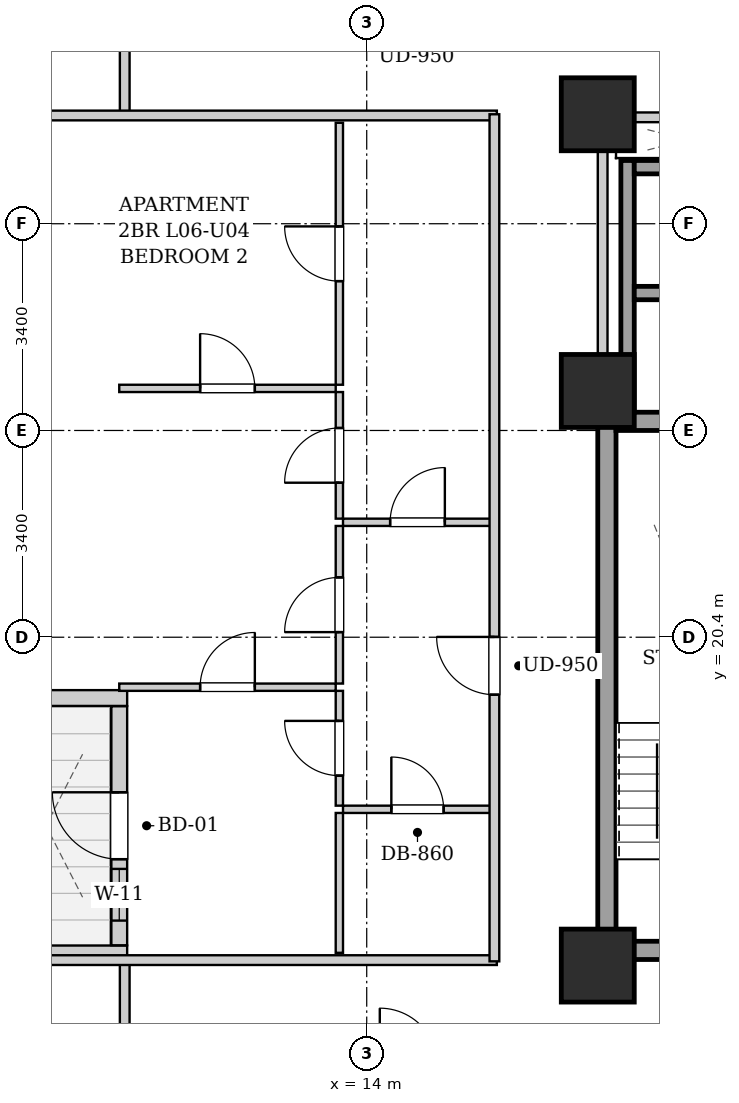
"""IFC4 building model, lengths in metres.
Left out: names, types, materials, properties, quantities, classifications, styles, units other than length and angle.
Written with IfcOpenShell. Run it as: python <this file> out.ifc"""

import sys

from ifc_helpers import new_model, si_unit, direction, frame, frame_2d, origin, origin_2d, place, context, subcontext, project, spatial, rectangle, extrude, element, fill, save


model = new_model("IFC4")
c1 = context("Model", 3, precision=1e-05, world=origin(), true_north=direction((0.0, 1.0)))
c2 = subcontext(c1, "Body", "Model", "MODEL_VIEW")
j1 = project(units=[si_unit("LENGTHUNIT", "METRE"), si_unit("PLANEANGLEUNIT", "RADIAN")], contexts=[c1])
p1 = place(None, origin())
s1 = spatial("IfcSite", under=j1, at=p1, CompositionType="ELEMENT")
p2 = place(p1, origin())
s2 = spatial("IfcBuilding", under=s1, at=p2, CompositionType="ELEMENT")
p3 = place(p2, frame((0.0, 0.0, 29.0)))
s3 = spatial("IfcBuildingStorey", under=s2, at=p3, CompositionType="ELEMENT", Elevation=29.0)
for number, where, z_axis, x_axis in (
    (1, (17.8, 15.0, 0.0), (0.0, 0.0, 1.0), (1.0, 0.0, 0.0)),
    (2, (17.8, 29.0, 0.0), (0.0, 0.0, 1.0), (1.0, 0.0, 0.0)),
    (3, (17.8, 24.45, 0.0), (0.0, 0.0, 1.0), (1.0, 0.0, 0.0)),
):
    element("IfcColumn", number, at=place(p3, frame(where, z_axis=z_axis, x_axis=x_axis)), inside=s3, PredefinedType="COLUMN", context=c2, shape_type="SweptSolid", body=[
        extrude(rectangle(XDim=1.2, YDim=1.2, at=origin_2d()), origin(), (0.0, 0.0, 1.0), 3.2),
    ])
p4 = place(p3, frame((7.66, 15.2, 0.0), z_axis=(0.0, 0.0, 1.0), x_axis=(1.0, 0.0, 0.0)))
e4 = element("IfcWall", 4, at=p4, inside=s3, PredefinedType="SOLIDWALL", context=c2, shape_type="SweptSolid", body=[
    extrude(rectangle(XDim=2.4, YDim=0.26, at=frame_2d((1.2, 0.0))), origin(), (0.0, 0.0, 1.0), 2.94),
])
p5 = place(p3, frame((9.93, 15.334, 0.0), z_axis=(0.0, 0.0, 1.0), x_axis=(0.0, 1.0, 0.0)))
e5 = element("IfcWall", 5, at=p5, inside=s3, PredefinedType="SOLIDWALL", context=c2, shape_type="SweptSolid", body=[
    extrude(rectangle(XDim=3.932, YDim=0.26, at=frame_2d((1.966, 0.0))), origin(), (0.0, 0.0, 1.0), 2.94),
])
p6 = place(p5, frame((1.416, 0.0, 0.0)))
e6 = element("IfcOpeningElement", 6, at=p6, cuts=e5, PredefinedType="OPENING", context=c2, shape_type="SweptSolid", body=[
    extrude(rectangle(XDim=1.1, YDim=2.0, at=frame_2d((0.55, 1.0))), frame((0.0, 0.14, 0.0), z_axis=(0.0, -1.0, 0.0), x_axis=(1.0, 0.0, 0.0)), (0.0, 0.0, 1.0), 0.28),
])
p7 = place(p5, frame((0.406, 0.0, 0.55)))
e7 = element("IfcOpeningElement", 7, at=p7, cuts=e5, PredefinedType="OPENING", context=c2, shape_type="SweptSolid", body=[
    extrude(rectangle(XDim=0.85, YDim=1.2, at=frame_2d((0.425, 0.6))), frame((0.0, 0.14, 0.0), z_axis=(0.0, -1.0, 0.0), x_axis=(1.0, 0.0, 0.0)), (0.0, 0.0, 1.0), 0.28),
])
p8 = place(p3, frame((10.06, 19.4, 0.0), z_axis=(0.0, 0.0, 1.0), x_axis=(-1.0, 0.0, 0.0)))
e8 = element("IfcWall", 8, at=p8, inside=s3, PredefinedType="SOLIDWALL", context=c2, shape_type="SweptSolid", body=[
    extrude(rectangle(XDim=2.4, YDim=0.26, at=frame_2d((1.2, 0.0))), origin(), (0.0, 0.0, 1.0), 2.94),
])
p9 = place(p3, frame((17.95, 15.1, 0.0), z_axis=(0.0, 0.0, 1.0), x_axis=(0.0, 1.0, 0.0)))
e9 = element("IfcWall", 9, at=p9, inside=s3, PredefinedType="SHEAR", context=c2, shape_type="SweptSolid", body=[
    extrude(rectangle(XDim=9.0, YDim=0.3, at=frame_2d((4.5, 0.0))), origin(), (0.0, 0.0, 1.0), 2.94),
])
p10 = place(p3, frame((18.1, 23.95, 0.0), z_axis=(0.0, 0.0, 1.0), x_axis=(1.0, 0.0, 0.0)))
e10 = element("IfcWall", 10, at=p10, inside=s3, PredefinedType="SHEAR", context=c2, shape_type="SweptSolid", body=[
    extrude(rectangle(XDim=2.85, YDim=0.3, at=frame_2d((1.425, 0.0))), origin(), (0.0, 0.0, 1.0), 2.94),
])
p11 = place(p3, frame((18.1, 15.25, 0.0), z_axis=(0.0, 0.0, 1.0), x_axis=(1.0, 0.0, 0.0)))
e11 = element("IfcWall", 11, at=p11, inside=s3, PredefinedType="SHEAR", context=c2, shape_type="SweptSolid", body=[
    extrude(rectangle(XDim=2.85, YDim=0.3, at=frame_2d((1.425, 0.0))), origin(), (0.0, 0.0, 1.0), 2.94),
])
p12 = place(p11, frame((0.86, 0.0, 0.0)))
e12 = element("IfcOpeningElement", 12, at=p12, cuts=e11, PredefinedType="OPENING", context=c2, shape_type="SweptSolid", body=[
    extrude(rectangle(XDim=1.1, YDim=2.05, at=frame_2d((0.55, 1.025))), frame((0.0, 0.16, 0.0), z_axis=(0.0, -1.0, 0.0), x_axis=(1.0, 0.0, 0.0)), (0.0, 0.0, 1.0), 0.32),
])
p13 = place(p3, frame((18.29, 24.1, 0.0), z_axis=(0.0, 0.0, 1.0), x_axis=(0.0, 1.0, 0.0)))
e13 = element("IfcWall", 13, at=p13, inside=s3, PredefinedType="SHEAR", context=c2, shape_type="SweptSolid", body=[
    extrude(rectangle(XDim=4.14, YDim=0.22, at=frame_2d((2.07, 0.0))), origin(), (0.0, 0.0, 1.0), 2.94),
])
for number, where, z_axis, x_axis in (
    (14, (18.4, 26.06, 0.0), (0.0, 0.0, 1.0), (1.0, 0.0, 0.0)),
    (15, (18.4, 28.13, 0.0), (0.0, 0.0, 1.0), (1.0, 0.0, 0.0)),
):
    element("IfcWall", number, at=place(p3, frame(where, z_axis=z_axis, x_axis=x_axis)), inside=s3, PredefinedType="SHEAR", context=c2, shape_type="SweptSolid", body=[
        extrude(rectangle(XDim=1.9, YDim=0.22, at=frame_2d((0.95, 0.0))), origin(), (0.0, 0.0, 1.0), 2.94),
    ])
p14 = place(p3, frame((17.88, 24.12, 0.0), z_axis=(0.0, 0.0, 1.0), x_axis=(0.0, 1.0, 0.0)))
e16 = element("IfcWall", 16, at=p14, inside=s3, PredefinedType="PARTITIONING", context=c2, shape_type="SweptSolid", body=[
    extrude(rectangle(XDim=4.76, YDim=0.16, at=frame_2d((2.38, 0.0))), origin(), (0.0, 0.0, 1.0), 2.275),
])
p15 = place(p3, frame((17.96, 28.95, 0.0), z_axis=(0.0, 0.0, 1.0), x_axis=(1.0, 0.0, 0.0)))
e17 = element("IfcWall", 17, at=p15, inside=s3, PredefinedType="PARTITIONING", context=c2, shape_type="SweptSolid", body=[
    extrude(rectangle(XDim=4.29, YDim=0.16, at=frame_2d((2.145, 0.0))), origin(), (0.0, 0.0, 1.0), 2.155),
])
p16 = place(p15, frame((1.57, 0.0, 0.0)))
e18 = element("IfcOpeningElement", 18, at=p16, cuts=e17, PredefinedType="OPENING", context=c2, shape_type="SweptSolid", body=[
    extrude(rectangle(XDim=0.86, YDim=2.05, at=frame_2d((0.43, 1.025))), frame((0.0, 0.09, 0.0), z_axis=(0.0, -1.0, 0.0), x_axis=(1.0, 0.0, 0.0)), (0.0, 0.0, 1.0), 0.18),
])
for number, where, z_axis, x_axis in (
    (19, (10.02, 13.35, 0.0), (0.0, 0.0, 1.0), (0.0, 1.0, 0.0)),
    (20, (10.02, 28.98, 0.0), (0.0, 0.0, 1.0), (0.0, 1.0, 0.0)),
):
    element("IfcWall", number, at=place(p3, frame(where, z_axis=z_axis, x_axis=x_axis)), inside=s3, PredefinedType="PARTITIONING", context=c2, shape_type="SweptSolid", body=[
        extrude(rectangle(XDim=1.74, YDim=0.16, at=frame_2d((0.87, 0.0))), origin(), (0.0, 0.0, 1.0), 2.94),
    ])
for number, where, z_axis, x_axis in (
    (21, (7.78, 15.09, 0.0), (0.0, 0.0, 1.0), (1.0, 0.0, 0.0)),
    (22, (7.78, 28.98, 0.0), (0.0, 0.0, 1.0), (1.0, 0.0, 0.0)),
):
    element("IfcWall", number, at=place(p3, frame(where, z_axis=z_axis, x_axis=x_axis)), inside=s3, PredefinedType="PARTITIONING", context=c2, shape_type="SweptSolid", body=[
        extrude(rectangle(XDim=8.36, YDim=0.16, at=frame_2d((4.18, 0.0))), origin(), (0.0, 0.0, 1.0), 2.155),
    ])
p17 = place(p3, frame((13.61, 22.29, 0.0), z_axis=(0.0, 0.0, 1.0), x_axis=(1.0, 0.0, 0.0)))
e23 = element("IfcWall", 23, at=p17, inside=s3, PredefinedType="PARTITIONING", context=c2, shape_type="SweptSolid", body=[
    extrude(rectangle(XDim=2.45, YDim=0.12, at=frame_2d((1.225, 0.0))), origin(), (0.0, 0.0, 1.0), 2.94),
])
p18 = place(p17, frame((0.775, 0.0, 0.0)))
e24 = element("IfcOpeningElement", 24, at=p18, cuts=e23, PredefinedType="OPENING", context=c2, shape_type="SweptSolid", body=[
    extrude(rectangle(XDim=0.9, YDim=2.05, at=frame_2d((0.45, 1.025))), frame((0.0, 0.07, 0.0), z_axis=(0.0, -1.0, 0.0), x_axis=(1.0, 0.0, 0.0)), (0.0, 0.0, 1.0), 0.14),
])
p19 = place(p3, frame((13.55, 22.35, 0.0), z_axis=(0.0, 0.0, 1.0), x_axis=(0.0, 1.0, 0.0)))
e25 = element("IfcWall", 25, at=p19, inside=s3, PredefinedType="PARTITIONING", context=c2, shape_type="SweptSolid", body=[
    extrude(rectangle(XDim=2.082, YDim=0.12, at=frame_2d((1.041, 0.0))), origin(), (0.0, 0.0, 1.0), 2.94),
])
p20 = place(p19, frame((0.591, 0.0, 0.0)))
e26 = element("IfcOpeningElement", 26, at=p20, cuts=e25, PredefinedType="OPENING", context=c2, shape_type="SweptSolid", body=[
    extrude(rectangle(XDim=0.9, YDim=2.05, at=frame_2d((0.45, 1.025))), frame((0.0, 0.07, 0.0), z_axis=(0.0, -1.0, 0.0), x_axis=(1.0, 0.0, 0.0)), (0.0, 0.0, 1.0), 0.14),
])
p21 = place(p3, frame((13.55, 24.552, 0.0), z_axis=(0.0, 0.0, 1.0), x_axis=(0.0, 1.0, 0.0)))
e27 = element("IfcWall", 27, at=p21, inside=s3, PredefinedType="PARTITIONING", context=c2, shape_type="SweptSolid", body=[
    extrude(rectangle(XDim=4.308, YDim=0.12, at=frame_2d((2.154, 0.0))), origin(), (0.0, 0.0, 1.0), 2.94),
])
p22 = place(p21, frame((1.704, 0.0, 0.0)))
e28 = element("IfcOpeningElement", 28, at=p22, cuts=e27, PredefinedType="OPENING", context=c2, shape_type="SweptSolid", body=[
    extrude(rectangle(XDim=0.9, YDim=2.05, at=frame_2d((0.45, 1.025))), frame((0.0, 0.07, 0.0), z_axis=(0.0, -1.0, 0.0), x_axis=(1.0, 0.0, 0.0)), (0.0, 0.0, 1.0), 0.14),
])
p23 = place(p3, frame((13.61, 17.57, 0.0), z_axis=(0.0, 0.0, 1.0), x_axis=(1.0, 0.0, 0.0)))
e29 = element("IfcWall", 29, at=p23, inside=s3, PredefinedType="PARTITIONING", context=c2, shape_type="SweptSolid", body=[
    extrude(rectangle(XDim=2.45, YDim=0.12, at=frame_2d((1.225, 0.0))), origin(), (0.0, 0.0, 1.0), 2.94),
])
p24 = place(p23, frame((0.795, 0.0, 0.0)))
e30 = element("IfcOpeningElement", 30, at=p24, cuts=e29, PredefinedType="OPENING", context=c2, shape_type="SweptSolid", body=[
    extrude(rectangle(XDim=0.86, YDim=2.05, at=frame_2d((0.43, 1.025))), frame((0.0, 0.07, 0.0), z_axis=(0.0, -1.0, 0.0), x_axis=(1.0, 0.0, 0.0)), (0.0, 0.0, 1.0), 0.14),
])
p25 = place(p3, frame((13.55, 15.21, 0.0), z_axis=(0.0, 0.0, 1.0), x_axis=(0.0, 1.0, 0.0)))
e31 = element("IfcWall", 31, at=p25, inside=s3, PredefinedType="PARTITIONING", context=c2, shape_type="SweptSolid", body=[
    extrude(rectangle(XDim=2.3, YDim=0.12, at=frame_2d((1.15, 0.0))), origin(), (0.0, 0.0, 1.0), 2.94),
])
p26 = place(p3, frame((13.55, 17.63, 0.0), z_axis=(0.0, 0.0, 1.0), x_axis=(0.0, 1.0, 0.0)))
e32 = element("IfcWall", 32, at=p26, inside=s3, PredefinedType="PARTITIONING", context=c2, shape_type="SweptSolid", body=[
    extrude(rectangle(XDim=1.888, YDim=0.12, at=frame_2d((0.944, 0.0))), origin(), (0.0, 0.0, 1.0), 2.94),
])
p27 = place(p26, frame((0.494, 0.0, 0.0)))
e33 = element("IfcOpeningElement", 33, at=p27, cuts=e32, PredefinedType="OPENING", context=c2, shape_type="SweptSolid", body=[
    extrude(rectangle(XDim=0.9, YDim=2.05, at=frame_2d((0.45, 1.025))), frame((0.0, 0.07, 0.0), z_axis=(0.0, -1.0, 0.0), x_axis=(1.0, 0.0, 0.0)), (0.0, 0.0, 1.0), 0.14),
])
p28 = place(p3, frame((13.55, 19.638, 0.0), z_axis=(0.0, 0.0, 1.0), x_axis=(0.0, 1.0, 0.0)))
e34 = element("IfcWall", 34, at=p28, inside=s3, PredefinedType="PARTITIONING", context=c2, shape_type="SweptSolid", body=[
    extrude(rectangle(XDim=2.592, YDim=0.12, at=frame_2d((1.296, 0.0))), origin(), (0.0, 0.0, 1.0), 2.94),
])
p29 = place(p28, frame((0.846, 0.0, 0.0)))
e35 = element("IfcOpeningElement", 35, at=p29, cuts=e34, PredefinedType="OPENING", context=c2, shape_type="SweptSolid", body=[
    extrude(rectangle(XDim=0.9, YDim=2.05, at=frame_2d((0.45, 1.025))), frame((0.0, 0.07, 0.0), z_axis=(0.0, -1.0, 0.0), x_axis=(1.0, 0.0, 0.0)), (0.0, 0.0, 1.0), 0.14),
])
p30 = place(p3, frame((9.93, 19.578, 0.0), z_axis=(0.0, 0.0, 1.0), x_axis=(1.0, 0.0, 0.0)))
e36 = element("IfcWall", 36, at=p30, inside=s3, PredefinedType="PARTITIONING", context=c2, shape_type="SweptSolid", body=[
    extrude(rectangle(XDim=3.56, YDim=0.12, at=frame_2d((1.78, 0.0))), origin(), (0.0, 0.0, 1.0), 2.94),
])
p31 = place(p30, frame((1.33, 0.0, 0.0)))
e37 = element("IfcOpeningElement", 37, at=p31, cuts=e36, PredefinedType="OPENING", context=c2, shape_type="SweptSolid", body=[
    extrude(rectangle(XDim=0.9, YDim=2.05, at=frame_2d((0.45, 1.025))), frame((0.0, 0.07, 0.0), z_axis=(0.0, -1.0, 0.0), x_axis=(1.0, 0.0, 0.0)), (0.0, 0.0, 1.0), 0.14),
])
p32 = place(p3, frame((9.93, 24.492, 0.0), z_axis=(0.0, 0.0, 1.0), x_axis=(1.0, 0.0, 0.0)))
e38 = element("IfcWall", 38, at=p32, inside=s3, PredefinedType="PARTITIONING", context=c2, shape_type="SweptSolid", body=[
    extrude(rectangle(XDim=3.56, YDim=0.12, at=frame_2d((1.78, 0.0))), origin(), (0.0, 0.0, 1.0), 2.508),
])
p33 = place(p32, frame((1.33, 0.0, 0.0)))
e39 = element("IfcOpeningElement", 39, at=p33, cuts=e38, PredefinedType="OPENING", context=c2, shape_type="SweptSolid", body=[
    extrude(rectangle(XDim=0.9, YDim=2.05, at=frame_2d((0.45, 1.025))), frame((0.0, 0.07, 0.0), z_axis=(0.0, -1.0, 0.0), x_axis=(1.0, 0.0, 0.0)), (0.0, 0.0, 1.0), 0.14),
])
p34 = place(p3, frame((16.1, 15.07, 0.0), z_axis=(0.0, 0.0, 1.0), x_axis=(0.0, 1.0, 0.0)))
e40 = element("IfcWall", 40, at=p34, inside=s3, PredefinedType="PARTITIONING", context=c2, shape_type="SweptSolid", body=[
    extrude(rectangle(XDim=13.93, YDim=0.16, at=frame_2d((6.965, 0.0))), origin(), (0.0, 0.0, 1.0), 2.94),
])
p35 = place(p34, frame((4.385, 0.0, 0.0)))
e41 = element("IfcOpeningElement", 41, at=p35, cuts=e40, PredefinedType="OPENING", context=c2, shape_type="SweptSolid", body=[
    extrude(rectangle(XDim=0.95, YDim=2.1, at=frame_2d((0.475, 1.05))), frame((0.0, 0.09, 0.0), z_axis=(0.0, -1.0, 0.0), x_axis=(1.0, 0.0, 0.0)), (0.0, 0.0, 1.0), 0.18),
])
p36 = place(p18, origin())
e42 = element("IfcDoor", 42, at=p36, inside=s3, OperationType="SINGLE_SWING_RIGHT", PredefinedType="DOOR", context=c2, shape_type="SweptSolid", body=[
    extrude(rectangle(XDim=0.9, YDim=2.05, at=frame_2d((0.45, 1.025))), frame((0.0, 0.025, 0.0), z_axis=(0.0, -1.0, 0.0), x_axis=(1.0, 0.0, 0.0)), (0.0, 0.0, 1.0), 0.05),
])
fill(e24, e42)
p37 = place(p20, origin())
e43 = element("IfcDoor", 43, at=p37, inside=s3, OperationType="SINGLE_SWING_LEFT", PredefinedType="DOOR", context=c2, shape_type="SweptSolid", body=[
    extrude(rectangle(XDim=0.9, YDim=2.05, at=frame_2d((0.45, 1.025))), frame((0.0, 0.025, 0.0), z_axis=(0.0, -1.0, 0.0), x_axis=(1.0, 0.0, 0.0)), (0.0, 0.0, 1.0), 0.05),
])
fill(e26, e43)
p38 = place(p22, origin())
e44 = element("IfcDoor", 44, at=p38, inside=s3, OperationType="SINGLE_SWING_RIGHT", PredefinedType="DOOR", context=c2, shape_type="SweptSolid", body=[
    extrude(rectangle(XDim=0.9, YDim=2.05, at=frame_2d((0.45, 1.025))), frame((0.0, 0.025, 0.0), z_axis=(0.0, -1.0, 0.0), x_axis=(1.0, 0.0, 0.0)), (0.0, 0.0, 1.0), 0.05),
])
fill(e28, e44)
p39 = place(p24, origin())
e45 = element("IfcDoor", 45, at=p39, inside=s3, OperationType="SINGLE_SWING_LEFT", PredefinedType="DOOR", context=c2, shape_type="SweptSolid", body=[
    extrude(rectangle(XDim=0.86, YDim=2.05, at=frame_2d((0.43, 1.025))), frame((0.0, 0.025, 0.0), z_axis=(0.0, -1.0, 0.0), x_axis=(1.0, 0.0, 0.0)), (0.0, 0.0, 1.0), 0.05),
])
fill(e30, e45)
p40 = place(p27, origin())
e46 = element("IfcDoor", 46, at=p40, inside=s3, OperationType="SINGLE_SWING_RIGHT", PredefinedType="DOOR", context=c2, shape_type="SweptSolid", body=[
    extrude(rectangle(XDim=0.9, YDim=2.05, at=frame_2d((0.45, 1.025))), frame((0.0, 0.025, 0.0), z_axis=(0.0, -1.0, 0.0), x_axis=(1.0, 0.0, 0.0)), (0.0, 0.0, 1.0), 0.05),
])
fill(e33, e46)
p41 = place(p29, origin())
e47 = element("IfcDoor", 47, at=p41, inside=s3, OperationType="SINGLE_SWING_LEFT", PredefinedType="DOOR", context=c2, shape_type="SweptSolid", body=[
    extrude(rectangle(XDim=0.9, YDim=2.05, at=frame_2d((0.45, 1.025))), frame((0.0, 0.025, 0.0), z_axis=(0.0, -1.0, 0.0), x_axis=(1.0, 0.0, 0.0)), (0.0, 0.0, 1.0), 0.05),
])
fill(e35, e47)
p42 = place(p31, origin())
e48 = element("IfcDoor", 48, at=p42, inside=s3, OperationType="SINGLE_SWING_RIGHT", PredefinedType="DOOR", context=c2, shape_type="SweptSolid", body=[
    extrude(rectangle(XDim=0.9, YDim=2.05, at=frame_2d((0.45, 1.025))), frame((0.0, 0.025, 0.0), z_axis=(0.0, -1.0, 0.0), x_axis=(1.0, 0.0, 0.0)), (0.0, 0.0, 1.0), 0.05),
])
fill(e37, e48)
p43 = place(p33, origin())
e49 = element("IfcDoor", 49, at=p43, inside=s3, OperationType="SINGLE_SWING_LEFT", PredefinedType="DOOR", context=c2, shape_type="SweptSolid", body=[
    extrude(rectangle(XDim=0.9, YDim=2.05, at=frame_2d((0.45, 1.025))), frame((0.0, 0.025, 0.0), z_axis=(0.0, -1.0, 0.0), x_axis=(1.0, 0.0, 0.0)), (0.0, 0.0, 1.0), 0.05),
])
fill(e39, e49)
p44 = place(p35, origin())
e50 = element("IfcDoor", 50, at=p44, inside=s3, OperationType="SINGLE_SWING_RIGHT", PredefinedType="DOOR", context=c2, shape_type="SweptSolid", body=[
    extrude(rectangle(XDim=0.95, YDim=2.1, at=frame_2d((0.475, 1.05))), frame((0.0, 0.025, 0.0), z_axis=(0.0, -1.0, 0.0), x_axis=(1.0, 0.0, 0.0)), (0.0, 0.0, 1.0), 0.05),
])
fill(e41, e50)
p45 = place(p6, origin())
e51 = element("IfcDoor", 51, at=p45, inside=s3, OperationType="SINGLE_SWING_RIGHT", PredefinedType="DOOR", context=c2, shape_type="SweptSolid", body=[
    extrude(rectangle(XDim=1.1, YDim=2.0, at=frame_2d((0.55, 1.0))), frame((0.0, 0.025, 0.0), z_axis=(0.0, -1.0, 0.0), x_axis=(1.0, 0.0, 0.0)), (0.0, 0.0, 1.0), 0.05),
])
fill(e6, e51)
p46 = place(p7, origin())
e52 = element("IfcWindow", 52, at=p46, inside=s3, PartitioningType="SINGLE_PANEL", PredefinedType="WINDOW", context=c2, shape_type="SweptSolid", body=[
    extrude(rectangle(XDim=0.85, YDim=1.2, at=frame_2d((0.425, 0.6))), frame((0.0, 0.03, 0.0), z_axis=(0.0, -1.0, 0.0), x_axis=(1.0, 0.0, 0.0)), (0.0, 0.0, 1.0), 0.06),
])
fill(e7, e52)
save(model, sys.argv[1])
